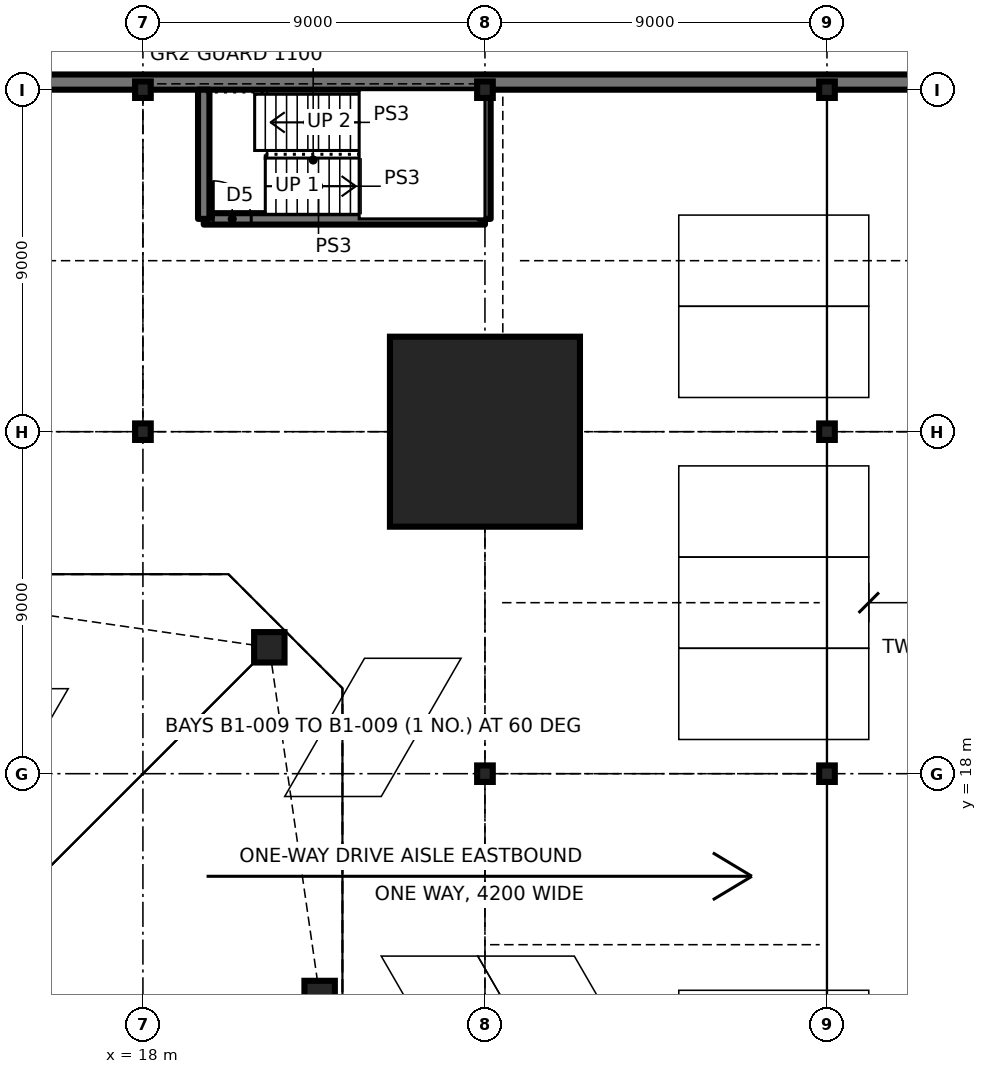
"""IFC4 building model, lengths in metres.
Left out: names, types, materials, properties, quantities, classifications, styles, units other than length and angle.
Written with IfcOpenShell. Run it as: python <this file> out.ifc"""

import sys

from ifc_helpers import new_model, si_unit, direction, frame, frame_2d, origin, origin_2d, place, context, subcontext, project, spatial, rectangle, hollow_rectangle, i_section, extrude, element, fill, save


model = new_model("IFC4")
c1 = context("Model", 3, precision=1e-05, world=origin(), true_north=direction((0.0, 1.0)))
c2 = subcontext(c1, "Body", "Model", "MODEL_VIEW")
j1 = project(units=[si_unit("LENGTHUNIT", "METRE"), si_unit("PLANEANGLEUNIT", "RADIAN")], contexts=[c1])
p1 = place(None, origin())
s1 = spatial("IfcSite", under=j1, at=p1, CompositionType="ELEMENT")
p2 = place(p1, origin())
s2 = spatial("IfcBuilding", under=s1, at=p2, CompositionType="ELEMENT")
p3 = place(p2, frame((0.0, 0.0, -3.6)))
s3 = spatial("IfcBuildingStorey", under=s2, at=p3, CompositionType="ELEMENT", Elevation=-3.6)
for number, where, z_axis, x_axis in (
    (1, (22.65, 12.15, 0.0), (0.0, 0.0, 1.0), (1.0, 0.0, 0.0)),
    (2, (21.326, 21.326, 0.0), (0.0, 0.0, 1.0), (1.0, 0.0, 0.0)),
):
    element("IfcColumn", number, at=place(p3, frame(where, z_axis=z_axis, x_axis=x_axis)), inside=s3, PredefinedType="COLUMN", context=c2, shape_type="SweptSolid", body=[
        extrude(hollow_rectangle(XDim=0.8, YDim=0.8, WallThickness=0.09, at=origin_2d()), origin(), (0.0, 0.0, 1.0), 3.6),
    ])
p4 = place(p3, frame((27.0, 27.0, 0.0), z_axis=(0.0, 0.0, 1.0), x_axis=(1.0, 0.0, 0.0)))
e3 = element("IfcColumn", 3, at=p4, inside=s3, PredefinedType="COLUMN", context=c2, shape_type="SweptSolid", body=[
    extrude(rectangle(XDim=5.0, YDim=5.0, at=origin_2d()), origin(), (0.0, 0.0, 1.0), 3.6),
    extrude(i_section(OverallWidth=0.478, OverallDepth=0.599, WebThickness=0.1, FlangeThickness=0.14, at=origin_2d()), origin(), (0.0, 0.0, 1.0), 3.6),
])
for number, where, z_axis, x_axis in (
    (4, (18.0, 27.0, 0.0), (0.0, 0.0, 1.0), (1.0, 0.0, 0.0)),
    (5, (18.0, 36.0, 0.0), (0.0, 0.0, 1.0), (1.0, 0.0, 0.0)),
    (6, (27.0, 18.0, 0.0), (0.0, 0.0, 1.0), (1.0, 0.0, 0.0)),
    (7, (27.0, 36.0, 0.0), (0.0, 0.0, 1.0), (1.0, 0.0, 0.0)),
    (8, (36.0, 18.0, 0.0), (0.0, 0.0, 1.0), (1.0, 0.0, 0.0)),
    (9, (36.0, 27.0, 0.0), (0.0, 0.0, 1.0), (1.0, 0.0, 0.0)),
    (10, (36.0, 36.0, 0.0), (0.0, 0.0, 1.0), (1.0, 0.0, 0.0)),
):
    element("IfcColumn", number, at=place(p3, frame(where, z_axis=z_axis, x_axis=x_axis)), inside=s3, PredefinedType="COLUMN", context=c2, shape_type="SweptSolid", body=[
        extrude(i_section(OverallWidth=0.411, OverallDepth=0.434, WebThickness=0.036, FlangeThickness=0.057, at=origin_2d()), origin(), (0.0, 0.0, 1.0), 3.6),
    ])
p5 = place(p3, frame((90.2, 36.2, 0.0), z_axis=(0.0, 0.0, 1.0), x_axis=(-1.0, 0.0, 0.0)))
e11 = element("IfcWall", 11, at=p5, inside=s3, PredefinedType="SOLIDWALL", context=c2, shape_type="SweptSolid", body=[
    extrude(rectangle(XDim=126.4, YDim=0.4, at=frame_2d((63.2, 0.0))), origin(), (0.0, 0.0, 1.0), 2.581),
])
p6 = place(p3, frame((19.6, 32.6, 0.0), z_axis=(0.0, 0.0, 1.0), x_axis=(1.0, 0.0, 0.0)))
e12 = element("IfcWall", 12, at=p6, inside=s3, PredefinedType="SOLIDWALL", context=c2, shape_type="SweptSolid", body=[
    extrude(rectangle(XDim=7.4, YDim=0.3, at=frame_2d((3.7, 0.0))), origin(), (0.0, 0.0, 1.0), 3.6),
])
p7 = place(p6, frame((0.25, 0.0, 0.0)))
e13 = element("IfcOpeningElement", 13, at=p7, cuts=e12, PredefinedType="OPENING", context=c2, shape_type="SweptSolid", body=[
    extrude(rectangle(XDim=1.0, YDim=2.1, at=frame_2d((0.5, 1.05))), frame((0.0, 0.16, 0.0), z_axis=(0.0, -1.0, 0.0), x_axis=(1.0, 0.0, 0.0)), (0.0, 0.0, 1.0), 0.32),
])
p8 = place(p3, frame((27.0, 32.6, 0.0), z_axis=(0.0, 0.0, 1.0), x_axis=(0.0, 1.0, 0.0)))
e14 = element("IfcWall", 14, at=p8, inside=s3, PredefinedType="SOLIDWALL", context=c2, shape_type="SweptSolid", body=[
    extrude(rectangle(XDim=3.183, YDim=0.3, at=frame_2d((1.591, 0.0))), origin(), (0.0, 0.0, 1.0), 3.6),
])
p9 = place(p3, frame((19.6, 32.6, 0.0), z_axis=(0.0, 0.0, 1.0), x_axis=(0.0, 1.0, 0.0)))
e15 = element("IfcWall", 15, at=p9, inside=s3, PredefinedType="SOLIDWALL", context=c2, shape_type="SweptSolid", body=[
    extrude(rectangle(XDim=3.4, YDim=0.3, at=frame_2d((1.7, 0.0))), origin(), (0.0, 0.0, 1.0), 3.6),
])
p10 = place(p7, origin())
e16 = element("IfcDoor", 16, at=p10, inside=s3, OperationType="SINGLE_SWING_LEFT", PredefinedType="DOOR", context=c2, shape_type="SweptSolid", body=[
    extrude(rectangle(XDim=1.0, YDim=2.1, at=frame_2d((0.5, 1.05))), frame((0.0, 0.025, 0.0), z_axis=(0.0, -1.0, 0.0), x_axis=(1.0, 0.0, 0.0)), (0.0, 0.0, 1.0), 0.05),
])
fill(e13, e16)
save(model, sys.argv[1])
